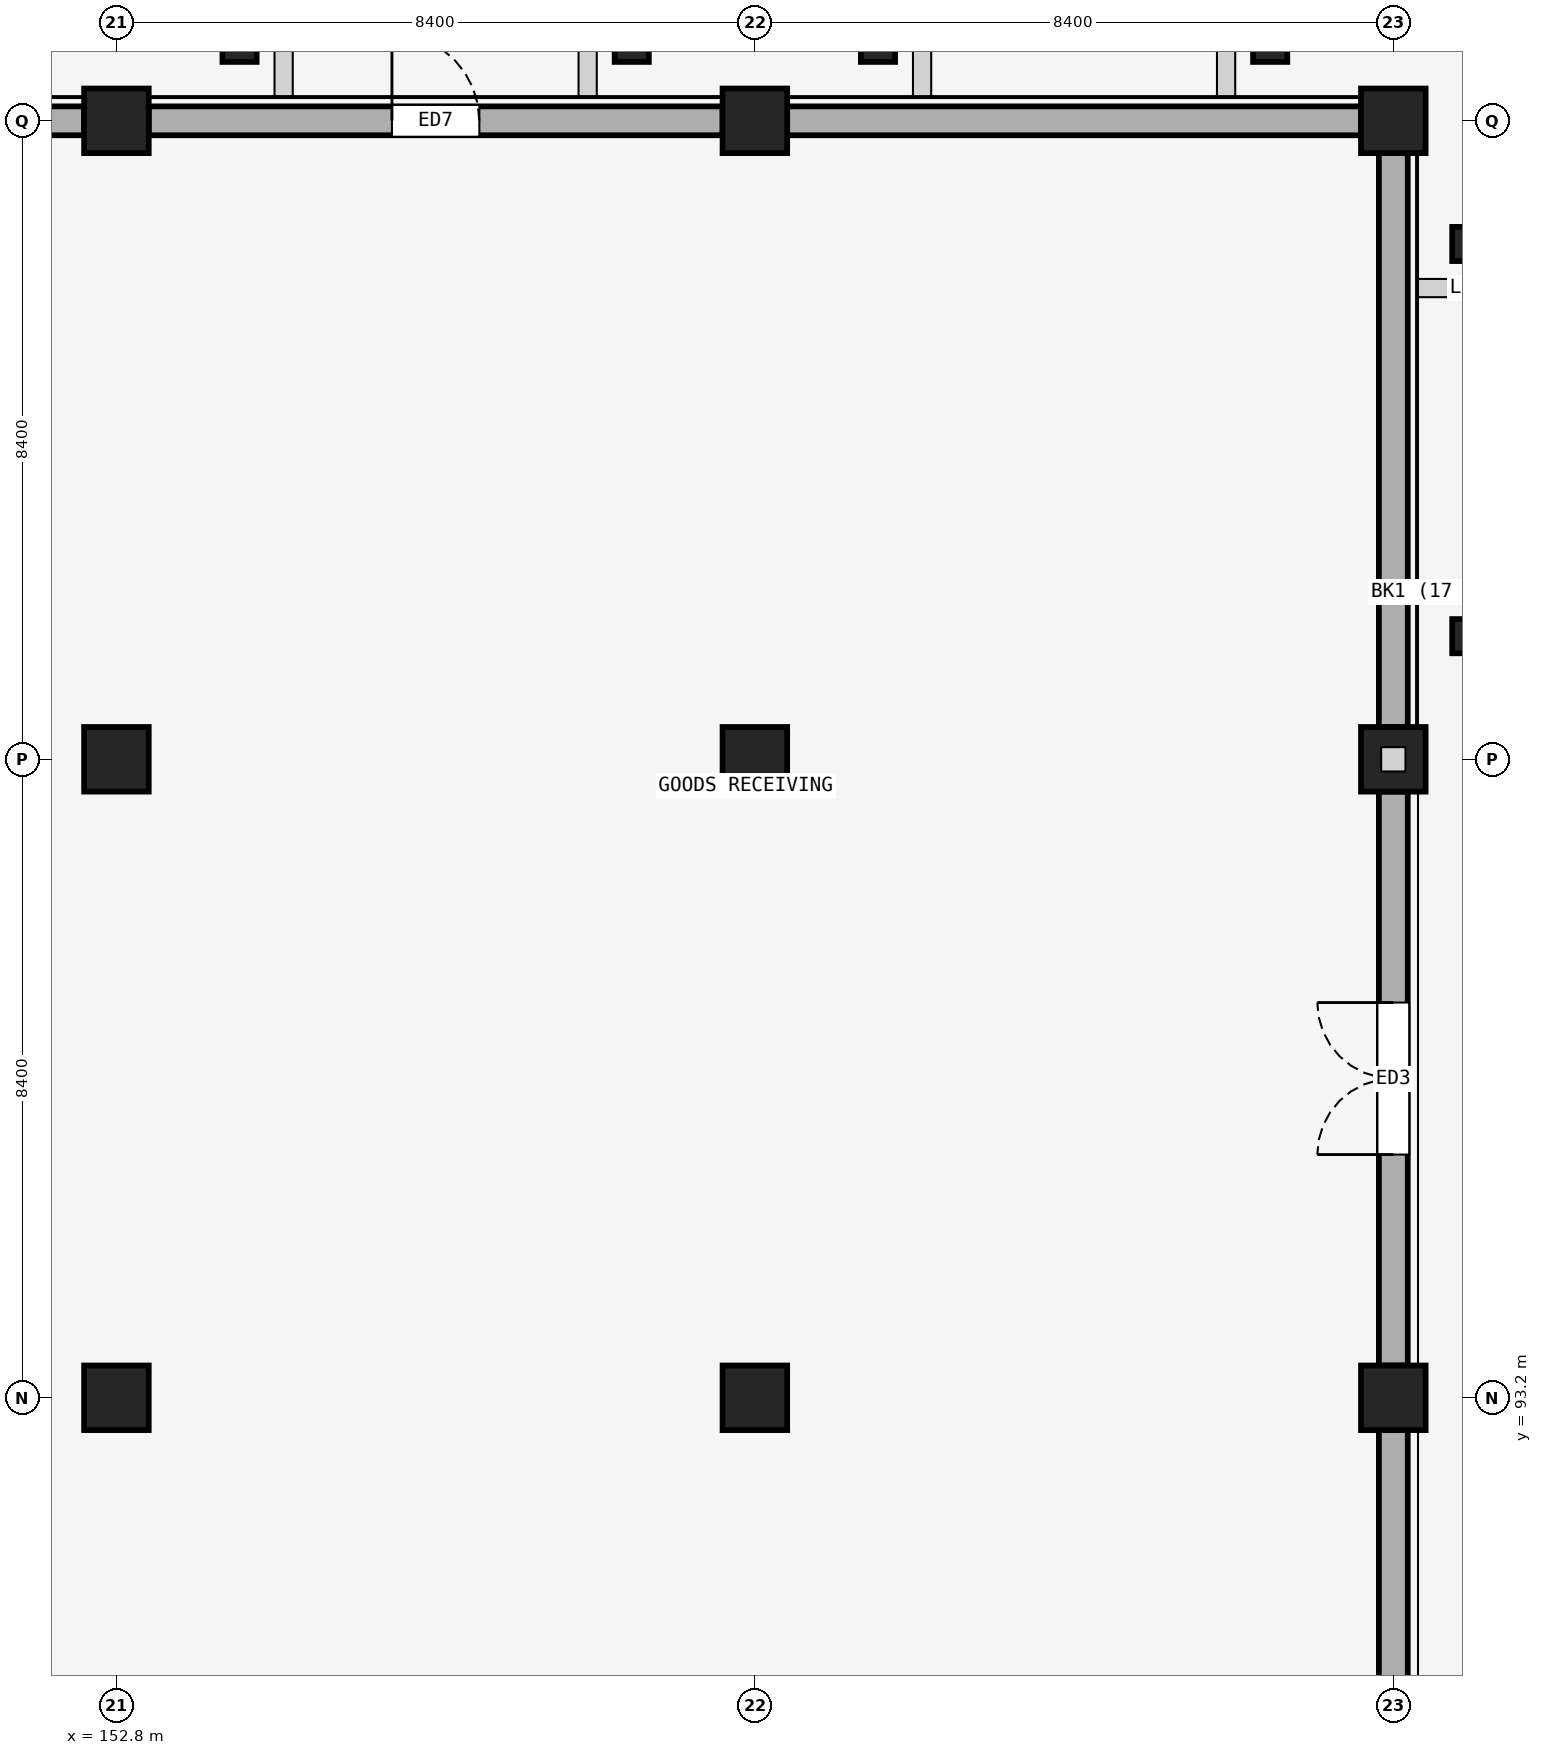
"""IFC4 building model, lengths in metres.
Left out: names, types, materials, properties, quantities, classifications, styles, units other than length and angle.
Written with IfcOpenShell. Run it as: python <this file> out.ifc"""

import sys

from ifc_helpers import new_model, si_unit, direction, frame, frame_2d, origin, origin_2d, place, context, subcontext, project, spatial, rectangle, extrude, element, fill, save


model = new_model("IFC4")
c1 = context("Model", 3, precision=1e-05, world=origin(), true_north=direction((0.0, 1.0)))
c2 = subcontext(c1, "Body", "Model", "MODEL_VIEW")
j1 = project(units=[si_unit("LENGTHUNIT", "METRE"), si_unit("PLANEANGLEUNIT", "RADIAN")], contexts=[c1])
p1 = place(None, origin())
s1 = spatial("IfcSite", under=j1, at=p1, CompositionType="ELEMENT")
p2 = place(p1, origin())
s2 = spatial("IfcBuilding", under=s1, at=p2, CompositionType="ELEMENT")
p3 = place(p2, origin())
s3 = spatial("IfcBuildingStorey", under=s2, at=p3, CompositionType="ELEMENT", Elevation=0.0)
for number, where, z_axis, x_axis in (
    (1, (152.8, 93.2, 0.0), (0.0, 0.0, 1.0), (1.0, 0.0, 0.0)),
    (2, (161.2, 93.2, 0.0), (0.0, 0.0, 1.0), (1.0, 0.0, 0.0)),
    (3, (169.6, 93.2, 0.0), (0.0, 0.0, 1.0), (1.0, 0.0, 0.0)),
    (4, (152.8, 101.6, 0.0), (0.0, 0.0, 1.0), (1.0, 0.0, 0.0)),
    (5, (161.2, 101.6, 0.0), (0.0, 0.0, 1.0), (1.0, 0.0, 0.0)),
    (6, (169.6, 101.6, 0.0), (0.0, 0.0, 1.0), (1.0, 0.0, 0.0)),
    (7, (152.8, 110.0, 0.0), (0.0, 0.0, 1.0), (1.0, 0.0, 0.0)),
    (8, (161.2, 110.0, 0.0), (0.0, 0.0, 1.0), (1.0, 0.0, 0.0)),
    (9, (169.6, 110.0, 0.0), (0.0, 0.0, 1.0), (1.0, 0.0, 0.0)),
):
    element("IfcColumn", number, at=place(p3, frame(where, z_axis=z_axis, x_axis=x_axis)), inside=s3, PredefinedType="COLUMN", context=c2, shape_type="SweptSolid", body=[
        extrude(rectangle(XDim=0.85, YDim=0.85, at=origin_2d()), origin(), (0.0, 0.0, 1.0), 5.4),
    ])
for number, where, z_axis, x_axis in (
    (10, (154.42, 111.05, 0.0), (0.0, 0.0, 1.0), (1.0, 0.0, 0.0)),
    (11, (159.58, 111.05, 0.0), (0.0, 0.0, 1.0), (1.0, 0.0, 0.0)),
    (12, (162.82, 111.05, 0.0), (0.0, 0.0, 1.0), (1.0, 0.0, 0.0)),
    (13, (167.98, 111.05, 0.0), (0.0, 0.0, 1.0), (1.0, 0.0, 0.0)),
    (14, (170.65, 103.22, 0.0), (0.0, 0.0, 1.0), (0.0, 1.0, 0.0)),
    (15, (170.65, 108.38, 0.0), (0.0, 0.0, 1.0), (0.0, 1.0, 0.0)),
):
    element("IfcColumn", number, at=place(p3, frame(where, z_axis=z_axis, x_axis=x_axis)), inside=s3, PredefinedType="PILASTER", context=c2, shape_type="SweptSolid", body=[
        extrude(rectangle(XDim=0.45, YDim=0.55, at=origin_2d()), origin(), (0.0, 0.0, 1.0), 5.4),
    ])
p4 = place(p3, frame((144.825, 110.0, 0.0), z_axis=(0.0, 0.0, 1.0), x_axis=(1.0, 0.0, 0.0)))
e16 = element("IfcWall", 16, at=p4, inside=s3, PredefinedType="SOLIDWALL", context=c2, shape_type="SweptSolid", body=[
    extrude(rectangle(XDim=7.55, YDim=0.38, at=frame_2d((3.775, 0.0))), origin(), (0.0, 0.0, 1.0), 4.35),
])
p5 = place(p3, frame((153.225, 110.0, 0.0), z_axis=(0.0, 0.0, 1.0), x_axis=(1.0, 0.0, 0.0)))
e17 = element("IfcWall", 17, at=p5, inside=s3, PredefinedType="SOLIDWALL", context=c2, shape_type="SweptSolid", body=[
    extrude(rectangle(XDim=7.55, YDim=0.38, at=frame_2d((3.775, 0.0))), origin(), (0.0, 0.0, 1.0), 4.35),
])
p6 = place(p5, frame((3.2, 0.0, 0.0)))
e18 = element("IfcOpeningElement", 18, at=p6, cuts=e17, PredefinedType="OPENING", context=c2, shape_type="SweptSolid", body=[
    extrude(rectangle(XDim=1.15, YDim=2.15, at=frame_2d((0.575, 1.075))), frame((0.0, 0.2, 0.0), z_axis=(0.0, -1.0, 0.0), x_axis=(1.0, 0.0, 0.0)), (0.0, 0.0, 1.0), 0.4),
])
p7 = place(p3, frame((161.625, 110.0, 0.0), z_axis=(0.0, 0.0, 1.0), x_axis=(1.0, 0.0, 0.0)))
e19 = element("IfcWall", 19, at=p7, inside=s3, PredefinedType="SOLIDWALL", context=c2, shape_type="SweptSolid", body=[
    extrude(rectangle(XDim=7.55, YDim=0.38, at=frame_2d((3.775, 0.0))), origin(), (0.0, 0.0, 1.0), 4.35),
])
p8 = place(p3, frame((169.6, 85.225, 0.0), z_axis=(0.0, 0.0, 1.0), x_axis=(0.0, 1.0, 0.0)))
e20 = element("IfcWall", 20, at=p8, inside=s3, PredefinedType="SOLIDWALL", context=c2, shape_type="SweptSolid", body=[
    extrude(rectangle(XDim=7.55, YDim=0.38, at=frame_2d((3.775, 0.0))), origin(), (0.0, 0.0, 1.0), 4.35),
])
p9 = place(p3, frame((169.6, 93.625, 0.0), z_axis=(0.0, 0.0, 1.0), x_axis=(0.0, 1.0, 0.0)))
e21 = element("IfcWall", 21, at=p9, inside=s3, PredefinedType="SOLIDWALL", context=c2, shape_type="SweptSolid", body=[
    extrude(rectangle(XDim=7.55, YDim=0.38, at=frame_2d((3.775, 0.0))), origin(), (0.0, 0.0, 1.0), 4.35),
])
p10 = place(p9, frame((2.775, 0.0, 0.0)))
e22 = element("IfcOpeningElement", 22, at=p10, cuts=e21, PredefinedType="OPENING", context=c2, shape_type="SweptSolid", body=[
    extrude(rectangle(XDim=2.0, YDim=2.5, at=frame_2d((1.0, 1.25))), frame((0.0, 0.2, 0.0), z_axis=(0.0, -1.0, 0.0), x_axis=(1.0, 0.0, 0.0)), (0.0, 0.0, 1.0), 0.4),
])
p11 = place(p3, frame((169.6, 102.025, 0.0), z_axis=(0.0, 0.0, 1.0), x_axis=(0.0, 1.0, 0.0)))
e23 = element("IfcWall", 23, at=p11, inside=s3, PredefinedType="SOLIDWALL", context=c2, shape_type="SweptSolid", body=[
    extrude(rectangle(XDim=7.55, YDim=0.38, at=frame_2d((3.775, 0.0))), origin(), (0.0, 0.0, 1.0), 4.35),
])
p12 = place(p6, origin())
e24 = element("IfcDoor", 24, at=p12, inside=s3, OperationType="SINGLE_SWING_LEFT", PredefinedType="DOOR", context=c2, shape_type="SweptSolid", body=[
    extrude(rectangle(XDim=1.15, YDim=2.15, at=frame_2d((0.575, 1.075))), frame((0.0, 0.025, 0.0), z_axis=(0.0, -1.0, 0.0), x_axis=(1.0, 0.0, 0.0)), (0.0, 0.0, 1.0), 0.05),
])
fill(e18, e24)
p13 = place(p10, origin())
e25 = element("IfcDoor", 25, at=p13, inside=s3, OperationType="DOUBLE_DOOR_SINGLE_SWING", PredefinedType="DOOR", context=c2, shape_type="SweptSolid", body=[
    extrude(rectangle(XDim=2.0, YDim=2.5, at=frame_2d((1.0, 1.25))), frame((0.0, 0.025, 0.0), z_axis=(0.0, -1.0, 0.0), x_axis=(1.0, 0.0, 0.0)), (0.0, 0.0, 1.0), 0.05),
])
fill(e22, e25)
save(model, sys.argv[1])
